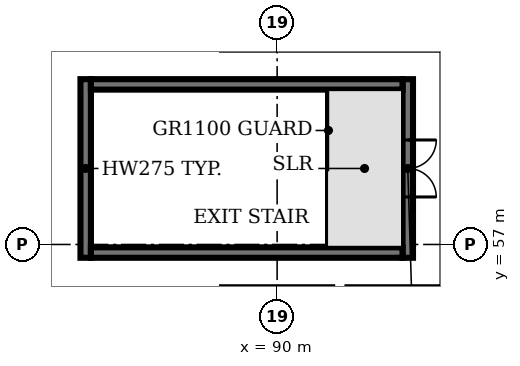
"""IFC4 building model, lengths in metres.
Left out: names, types, materials, properties, quantities, classifications, styles, units other than length and angle.
Written with IfcOpenShell. Run it as: python <this file> out.ifc"""

import sys

from ifc_helpers import new_model, si_unit, direction, frame, frame_2d, origin, place, context, subcontext, project, spatial, rectangle, extrude, element, fill, save


model = new_model("IFC4")
c1 = context("Model", 3, precision=1e-05, world=origin(), true_north=direction((0.0, 1.0)))
c2 = subcontext(c1, "Body", "Model", "MODEL_VIEW")
j1 = project(units=[si_unit("LENGTHUNIT", "METRE"), si_unit("PLANEANGLEUNIT", "RADIAN")], contexts=[c1])
p1 = place(None, origin())
s1 = spatial("IfcSite", under=j1, at=p1, CompositionType="ELEMENT")
p2 = place(p1, origin())
s2 = spatial("IfcBuilding", under=s1, at=p2, CompositionType="ELEMENT")
p3 = place(p2, frame((0.0, 0.0, 11.0)))
s3 = spatial("IfcBuildingStorey", under=s2, at=p3, CompositionType="ELEMENT", Elevation=11.0)
p4 = place(p3, frame((84.962, 56.65, 0.0), z_axis=(0.0, 0.0, 1.0), x_axis=(0.0, 1.0, 0.0)))
e1 = element("IfcWall", 1, at=p4, inside=s3, PredefinedType="SHEAR", context=c2, shape_type="SweptSolid", body=[
    extrude(rectangle(XDim=4.7, YDim=0.275, at=frame_2d((2.35, 0.0))), origin(), (0.0, 0.0, 1.0), 3.0),
])
p5 = place(p3, frame((93.438, 61.35, 0.0), z_axis=(0.0, 0.0, 1.0), x_axis=(0.0, -1.0, 0.0)))
e2 = element("IfcWall", 2, at=p5, inside=s3, PredefinedType="SHEAR", context=c2, shape_type="SweptSolid", body=[
    extrude(rectangle(XDim=4.7, YDim=0.275, at=frame_2d((2.35, 0.0))), origin(), (0.0, 0.0, 1.0), 3.0),
])
p6 = place(p5, frame((1.6, 0.0, 0.0)))
e3 = element("IfcOpeningElement", 3, at=p6, cuts=e2, PredefinedType="OPENING", context=c2, shape_type="SweptSolid", body=[
    extrude(rectangle(XDim=1.5, YDim=2.1, at=frame_2d((0.75, 1.05))), frame((0.0, 0.147, 0.0), z_axis=(0.0, -1.0, 0.0), x_axis=(1.0, 0.0, 0.0)), (0.0, 0.0, 1.0), 0.295),
])
for number, where, z_axis, x_axis in (
    (4, (85.1, 56.788, 0.0), (0.0, 0.0, 1.0), (1.0, 0.0, 0.0)),
    (5, (85.1, 61.212, 0.0), (0.0, 0.0, 1.0), (1.0, 0.0, 0.0)),
):
    element("IfcWall", number, at=place(p3, frame(where, z_axis=z_axis, x_axis=x_axis)), inside=s3, PredefinedType="SHEAR", context=c2, shape_type="SweptSolid", body=[
        extrude(rectangle(XDim=8.2, YDim=0.275, at=frame_2d((4.1, 0.0))), origin(), (0.0, 0.0, 1.0), 3.0),
    ])
p7 = place(p6, origin())
e6 = element("IfcDoor", 6, at=p7, inside=s3, OperationType="DOUBLE_DOOR_SINGLE_SWING", PredefinedType="DOOR", context=c2, shape_type="SweptSolid", body=[
    extrude(rectangle(XDim=1.5, YDim=2.1, at=frame_2d((0.75, 1.05))), frame((0.0, 0.025, 0.0), z_axis=(0.0, -1.0, 0.0), x_axis=(1.0, 0.0, 0.0)), (0.0, 0.0, 1.0), 0.05),
])
fill(e3, e6)
save(model, sys.argv[1])
